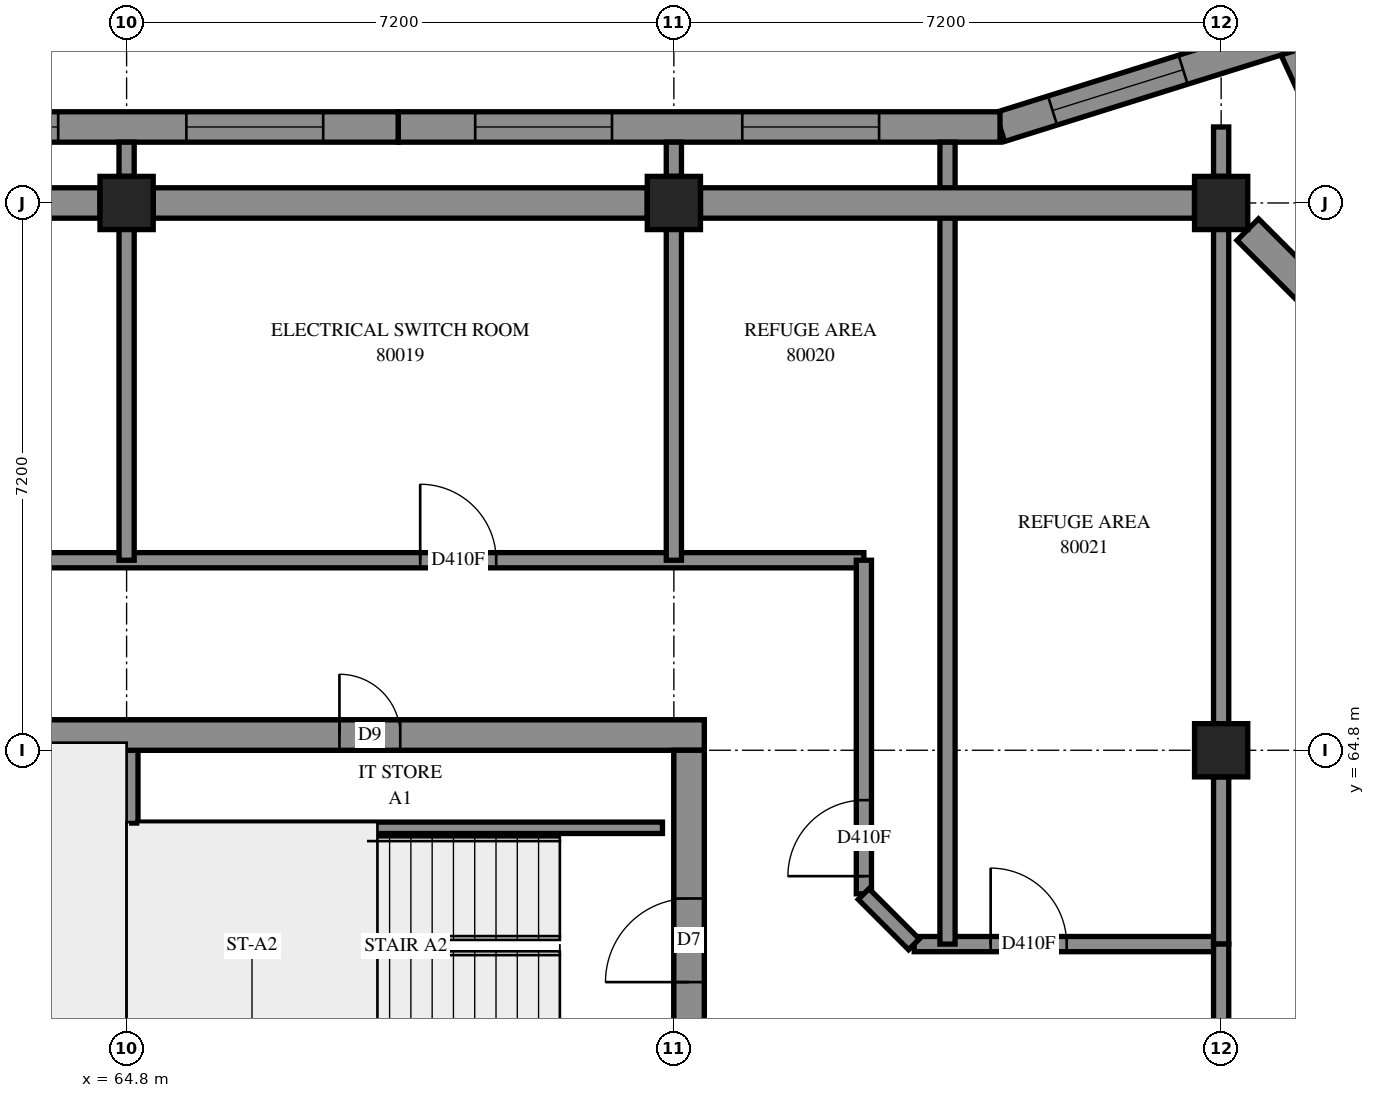
"""IFC4 building model, lengths in metres.
Left out: names, types, materials, properties, quantities, classifications, styles, units other than length and angle.
Written with IfcOpenShell. Run it as: python <this file> out.ifc"""

import sys

from ifc_helpers import new_model, si_unit, direction, frame, frame_2d, origin, origin_2d, place, context, subcontext, project, spatial, polyline, rectangle, outline, extrude, element, fill, save


model = new_model("IFC4")
c1 = context("Model", 3, precision=1e-05, world=origin(), true_north=direction((0.0, 1.0)))
c2 = subcontext(c1, "Body", "Model", "MODEL_VIEW")
j1 = project(units=[si_unit("LENGTHUNIT", "METRE"), si_unit("PLANEANGLEUNIT", "RADIAN")], contexts=[c1])
p1 = place(None, origin())
s1 = spatial("IfcSite", under=j1, at=p1, CompositionType="ELEMENT")
p2 = place(p1, origin())
s2 = spatial("IfcBuilding", under=s1, at=p2, CompositionType="ELEMENT")
p3 = place(p2, frame((0.0, 0.0, 294.4)))
s3 = spatial("IfcBuildingStorey", under=s2, at=p3, CompositionType="ELEMENT", Elevation=294.4)
for number, where, z_axis, x_axis in (
    (1, (64.8, 72.0, 0.0), (0.0, 0.0, 1.0), (1.0, 0.0, 0.0)),
    (2, (72.0, 72.0, 0.0), (0.0, 0.0, 1.0), (1.0, 0.0, 0.0)),
    (3, (79.2, 64.8, 0.0), (0.0, 0.0, 1.0), (1.0, 0.0, 0.0)),
    (4, (79.2, 72.0, 0.0), (0.0, 0.0, 1.0), (1.0, 0.0, 0.0)),
):
    element("IfcColumn", number, at=place(p3, frame(where, z_axis=z_axis, x_axis=x_axis)), inside=s3, PredefinedType="COLUMN", context=c2, shape_type="SweptSolid", body=[
        extrude(rectangle(XDim=0.7, YDim=0.7, at=origin_2d()), origin(), (0.0, 0.0, 1.0), 3.5),
    ])
p4 = place(p3, frame((57.2, 65.0, -0.3), z_axis=(0.0, 0.0, 1.0), x_axis=(1.0, 0.0, 0.0)))
e5 = element("IfcWall", 5, at=p4, inside=s3, PredefinedType="SHEAR", context=c2, shape_type="SweptSolid", body=[
    extrude(outline(polyline([(0.0, 0.0), (15.2, 0.0), (15.2, 3.1), (0.0, 3.1), (0.0, 0.0)])), frame((0.0, 0.2, 0.0), z_axis=(0.0, -1.0, 0.0), x_axis=(1.0, 0.0, 0.0)), (0.0, 0.0, 1.0), 0.4),
])
p5 = place(p4, frame((10.4, 0.0, 0.3)))
e6 = element("IfcOpeningElement", 6, at=p5, cuts=e5, PredefinedType="OPENING", context=c2, shape_type="SweptSolid", body=[
    extrude(rectangle(XDim=0.8, YDim=2.1, at=frame_2d((0.4, 1.05))), frame((0.0, 0.21, 0.0), z_axis=(0.0, -1.0, 0.0), x_axis=(1.0, 0.0, 0.0)), (0.0, 0.0, 1.0), 0.42),
])
p6 = place(p3, frame((72.2, 50.4, -0.3), z_axis=(0.0, 0.0, 1.0), x_axis=(0.0, 1.0, 0.0)))
e7 = element("IfcWall", 7, at=p6, inside=s3, PredefinedType="SHEAR", context=c2, shape_type="SweptSolid", body=[
    extrude(outline(polyline([(0.0, 0.0), (14.4, 0.0), (14.4, 3.1), (0.0, 3.1), (0.0, 0.0)])), frame((0.0, 0.2, 0.0), z_axis=(0.0, -1.0, 0.0), x_axis=(1.0, 0.0, 0.0)), (0.0, 0.0, 1.0), 0.4),
])
p7 = place(p6, frame((4.55, 0.0, 0.3)))
e8 = element("IfcOpeningElement", 8, at=p7, cuts=e7, PredefinedType="OPENING", context=c2, shape_type="SweptSolid", body=[
    extrude(rectangle(XDim=1.1, YDim=2.1, at=frame_2d((0.55, 1.05))), frame((0.0, 0.21, 0.0), z_axis=(0.0, -1.0, 0.0), x_axis=(1.0, 0.0, 0.0)), (0.0, 0.0, 1.0), 0.42),
])
p8 = place(p6, frame((11.35, 0.0, 0.3)))
e9 = element("IfcOpeningElement", 9, at=p8, cuts=e7, PredefinedType="OPENING", context=c2, shape_type="SweptSolid", body=[
    extrude(rectangle(XDim=1.1, YDim=2.1, at=frame_2d((0.55, 1.05))), frame((0.0, 0.21, 0.0), z_axis=(0.0, -1.0, 0.0), x_axis=(1.0, 0.0, 0.0)), (0.0, 0.0, 1.0), 0.42),
])
p9 = place(p3, frame((64.8, 60.6, 0.0), z_axis=(0.0, 0.0, 1.0), x_axis=(0.0, 1.0, 0.0)))
e10 = element("IfcWall", 10, at=p9, inside=s3, PredefinedType="SOLIDWALL", context=c2, shape_type="SweptSolid", body=[
    extrude(outline(polyline([(0.0, 0.0), (4.2, 0.0), (4.2, 3.5), (0.0, 3.5), (0.0, 0.0)])), frame((0.0, 0.15, 0.0), z_axis=(0.0, -1.0, 0.0), x_axis=(1.0, 0.0, 0.0)), (0.0, 0.0, 1.0), 0.3),
])
p10 = place(p3, frame((81.53, 71.085, 0.0), z_axis=(0.0, 0.0, 1.0), x_axis=(-0.4192825023, 0.9078558163, 0.0)))
e11 = element("IfcWall", 11, at=p10, inside=s3, PredefinedType="SOLIDWALL", context=c2, shape_type="SweptSolid", body=[
    extrude(outline(polyline([(0.036, -0.2), (3.596, -0.2), (3.245, 0.2), (-0.036, 0.2), (0.036, -0.2)])), origin(), (0.0, 0.0, 1.0), 3.5),
])
p11 = place(p10, frame((0.423, 0.0, 0.7)))
e12 = element("IfcOpeningElement", 12, at=p11, cuts=e11, PredefinedType="OPENING", context=c2, shape_type="SweptSolid", body=[
    extrude(rectangle(XDim=1.8, YDim=2.2, at=frame_2d((0.9, 1.1))), frame((0.0, 0.21, 0.0), z_axis=(0.0, -1.0, 0.0), x_axis=(1.0, 0.0, 0.0)), (0.0, 0.0, 1.0), 0.42),
])
p12 = place(p3, frame((80.096, 74.19, 0.0), z_axis=(0.0, 0.0, 1.0), x_axis=(-0.9544366751, -0.2984135272, 0.0)))
e13 = element("IfcWall", 13, at=p12, inside=s3, PredefinedType="SOLIDWALL", context=c2, shape_type="SweptSolid", body=[
    extrude(outline(polyline([(-0.176, -0.2), (3.956, -0.2), (4.017, 0.2), (0.176, 0.2), (-0.176, -0.2)])), origin(), (0.0, 0.0, 1.0), 3.5),
])
p13 = place(p12, frame((1.463, 0.0, 0.7)))
e14 = element("IfcOpeningElement", 14, at=p13, cuts=e13, PredefinedType="OPENING", context=c2, shape_type="SweptSolid", body=[
    extrude(rectangle(XDim=1.8, YDim=2.2, at=frame_2d((0.9, 1.1))), frame((0.0, 0.21, 0.0), z_axis=(0.0, -1.0, 0.0), x_axis=(1.0, 0.0, 0.0)), (0.0, 0.0, 1.0), 0.42),
])
p14 = place(p3, frame((76.29, 73.0, 0.0), z_axis=(0.0, 0.0, 1.0), x_axis=(-1.0, 0.0, 0.0)))
e15 = element("IfcWall", 15, at=p14, inside=s3, PredefinedType="SOLIDWALL", context=c2, shape_type="SweptSolid", body=[
    extrude(outline(polyline([(0.03, -0.2), (7.918, -0.2), (7.918, 0.2), (-0.03, 0.2), (0.03, -0.2)])), origin(), (0.0, 0.0, 1.0), 3.5),
])
p15 = place(p14, frame((1.591, 0.0, 0.7)))
e16 = element("IfcOpeningElement", 16, at=p15, cuts=e15, PredefinedType="OPENING", context=c2, shape_type="SweptSolid", body=[
    extrude(rectangle(XDim=1.8, YDim=2.2, at=frame_2d((0.9, 1.1))), frame((0.0, 0.21, 0.0), z_axis=(0.0, -1.0, 0.0), x_axis=(1.0, 0.0, 0.0)), (0.0, 0.0, 1.0), 0.42),
])
p16 = place(p14, frame((5.104, 0.0, 0.7)))
e17 = element("IfcOpeningElement", 17, at=p16, cuts=e15, PredefinedType="OPENING", context=c2, shape_type="SweptSolid", body=[
    extrude(rectangle(XDim=1.8, YDim=2.2, at=frame_2d((0.9, 1.1))), frame((0.0, 0.21, 0.0), z_axis=(0.0, -1.0, 0.0), x_axis=(1.0, 0.0, 0.0)), (0.0, 0.0, 1.0), 0.42),
])
p17 = place(p3, frame((68.373, 73.0, 0.0), z_axis=(0.0, 0.0, 1.0), x_axis=(-1.0, 0.0, 0.0)))
e18 = element("IfcWall", 18, at=p17, inside=s3, PredefinedType="SOLIDWALL", context=c2, shape_type="SweptSolid", body=[
    extrude(outline(polyline([(0.0, -0.2), (7.887, -0.2), (7.887, 0.2), (0.0, 0.2), (0.0, -0.2)])), origin(), (0.0, 0.0, 1.0), 3.5),
])
p18 = place(p17, frame((0.986, 0.0, 0.7)))
e19 = element("IfcOpeningElement", 19, at=p18, cuts=e18, PredefinedType="OPENING", context=c2, shape_type="SweptSolid", body=[
    extrude(rectangle(XDim=1.8, YDim=2.2, at=frame_2d((0.9, 1.1))), frame((0.0, 0.21, 0.0), z_axis=(0.0, -1.0, 0.0), x_axis=(1.0, 0.0, 0.0)), (0.0, 0.0, 1.0), 0.42),
])
p19 = place(p17, frame((4.473, 0.0, 0.7)))
e20 = element("IfcOpeningElement", 20, at=p19, cuts=e18, PredefinedType="OPENING", context=c2, shape_type="SweptSolid", body=[
    extrude(rectangle(XDim=1.8, YDim=2.2, at=frame_2d((0.9, 1.1))), frame((0.0, 0.21, 0.0), z_axis=(0.0, -1.0, 0.0), x_axis=(1.0, 0.0, 0.0)), (0.0, 0.0, 1.0), 0.42),
])
p20 = place(p3, frame((64.95, 63.78, 0.0), z_axis=(0.0, 0.0, 1.0), x_axis=(1.0, 0.0, 0.0)))
e21 = element("IfcWall", 21, at=p20, inside=s3, PredefinedType="PARTITIONING", context=c2, shape_type="SweptSolid", body=[
    extrude(outline(polyline([(0.0, 0.0), (6.9, 0.0), (6.9, 3.5), (0.0, 3.5), (0.0, 0.0)])), frame((0.0, 0.075, 0.0), z_axis=(0.0, -1.0, 0.0), x_axis=(1.0, 0.0, 0.0)), (0.0, 0.0, 1.0), 0.15),
])
p21 = place(p3, frame((55.102, 67.3, 0.0), z_axis=(0.0, 0.0, 1.0), x_axis=(1.0, 0.0, 0.0)))
e22 = element("IfcWall", 22, at=p21, inside=s3, PredefinedType="PARTITIONING", context=c2, shape_type="SweptSolid", body=[
    extrude(rectangle(XDim=19.398, YDim=0.2, at=frame_2d((9.699, 0.0))), origin(), (0.0, 0.0, 1.0), 3.5),
])
p22 = place(p21, frame((6.361, 0.0, 0.0)))
e23 = element("IfcOpeningElement", 23, at=p22, cuts=e22, PredefinedType="OPENING", context=c2, shape_type="SweptSolid", body=[
    extrude(rectangle(XDim=1.0, YDim=2.1, at=frame_2d((0.5, 1.05))), frame((0.0, 0.11, 0.0), z_axis=(0.0, -1.0, 0.0), x_axis=(1.0, 0.0, 0.0)), (0.0, 0.0, 1.0), 0.22),
])
p23 = place(p21, frame((13.56, 0.0, 0.0)))
e24 = element("IfcOpeningElement", 24, at=p23, cuts=e22, PredefinedType="OPENING", context=c2, shape_type="SweptSolid", body=[
    extrude(rectangle(XDim=1.0, YDim=2.1, at=frame_2d((0.5, 1.05))), frame((0.0, 0.11, 0.0), z_axis=(0.0, -1.0, 0.0), x_axis=(1.0, 0.0, 0.0)), (0.0, 0.0, 1.0), 0.22),
])
p24 = place(p3, frame((79.2, 64.45, 0.0), z_axis=(0.0, 0.0, 1.0), x_axis=(0.0, 1.0, 0.0)))
e25 = element("IfcWall", 25, at=p24, inside=s3, PredefinedType="PARTITIONING", context=c2, shape_type="SweptSolid", body=[
    extrude(rectangle(XDim=7.9, YDim=0.2, at=frame_2d((3.95, 0.0))), origin(), (0.0, 0.0, 1.0), 3.5),
])
p25 = place(p3, frame((74.5, 62.912, 0.0), z_axis=(0.0, 0.0, 1.0), x_axis=(0.0, 1.0, 0.0)))
e26 = element("IfcWall", 26, at=p25, inside=s3, PredefinedType="PARTITIONING", context=c2, shape_type="SweptSolid", body=[
    extrude(rectangle(XDim=4.388, YDim=0.2, at=frame_2d((2.194, 0.0))), origin(), (0.0, 0.0, 1.0), 3.5),
])
p26 = place(p25, frame((0.232, 0.0, 0.0)))
e27 = element("IfcOpeningElement", 27, at=p26, cuts=e26, PredefinedType="OPENING", context=c2, shape_type="SweptSolid", body=[
    extrude(rectangle(XDim=1.0, YDim=2.1, at=frame_2d((0.5, 1.05))), frame((0.0, 0.11, 0.0), z_axis=(0.0, -1.0, 0.0), x_axis=(1.0, 0.0, 0.0)), (0.0, 0.0, 1.0), 0.22),
])
for number, where, z_axis, x_axis in (
    (28, (64.8, 67.3, 0.0), (0.0, 0.0, 1.0), (0.0, 1.0, 0.0)),
    (29, (72.0, 67.3, 0.0), (0.0, 0.0, 1.0), (0.0, 1.0, 0.0)),
):
    element("IfcWall", number, at=place(p3, frame(where, z_axis=z_axis, x_axis=x_axis)), inside=s3, PredefinedType="PARTITIONING", context=c2, shape_type="SweptSolid", body=[
        extrude(rectangle(XDim=5.05, YDim=0.2, at=frame_2d((2.525, 0.0))), origin(), (0.0, 0.0, 1.0), 3.5),
    ])
p27 = place(p3, frame((75.162, 62.25, 0.0), z_axis=(0.0, 0.0, 1.0), x_axis=(1.0, 0.0, 0.0)))
e30 = element("IfcWall", 30, at=p27, inside=s3, PredefinedType="PARTITIONING", context=c2, shape_type="SweptSolid", body=[
    extrude(rectangle(XDim=4.038, YDim=0.2, at=frame_2d((2.019, 0.0))), origin(), (0.0, 0.0, 1.0), 3.5),
])
p28 = place(p27, frame((1.006, 0.0, 0.0)))
e31 = element("IfcOpeningElement", 31, at=p28, cuts=e30, PredefinedType="OPENING", context=c2, shape_type="SweptSolid", body=[
    extrude(rectangle(XDim=1.0, YDim=2.1, at=frame_2d((0.5, 1.05))), frame((0.0, 0.11, 0.0), z_axis=(0.0, -1.0, 0.0), x_axis=(1.0, 0.0, 0.0)), (0.0, 0.0, 1.0), 0.22),
])
p29 = place(p3, frame((79.2, 62.25, 0.0), z_axis=(0.0, 0.0, 1.0), x_axis=(0.0, 1.0, 0.0)))
e32 = element("IfcWall", 32, at=p29, inside=s3, PredefinedType="PARTITIONING", context=c2, shape_type="SweptSolid", body=[
    extrude(rectangle(XDim=2.2, YDim=0.2, at=frame_2d((1.1, 0.0))), origin(), (0.0, 0.0, 1.0), 3.5),
])
p30 = place(p3, frame((79.2, 60.15, 0.0), z_axis=(0.0, 0.0, 1.0), x_axis=(0.0, 1.0, 0.0)))
e33 = element("IfcWall", 33, at=p30, inside=s3, PredefinedType="PARTITIONING", context=c2, shape_type="SweptSolid", body=[
    extrude(rectangle(XDim=2.1, YDim=0.2, at=frame_2d((1.05, 0.0))), origin(), (0.0, 0.0, 1.0), 3.5),
])
p31 = place(p3, frame((74.496, 62.908, 0.0), z_axis=(0.0, 0.0, 1.0), x_axis=(0.7071067812, -0.7071067812, 0.0)))
e34 = element("IfcWall", 34, at=p31, inside=s3, PredefinedType="PARTITIONING", context=c2, shape_type="SweptSolid", body=[
    extrude(rectangle(XDim=0.936, YDim=0.2, at=frame_2d((0.468, 0.0))), origin(), (0.0, 0.0, 1.0), 3.5),
])
p32 = place(p3, frame((79.2, 72.35, 0.0), z_axis=(0.0, 0.0, 1.0), x_axis=(0.0, 1.0, 0.0)))
e35 = element("IfcWall", 35, at=p32, inside=s3, PredefinedType="PARTITIONING", context=c2, shape_type="SweptSolid", body=[
    extrude(rectangle(XDim=0.65, YDim=0.2, at=frame_2d((0.325, 0.0))), origin(), (0.0, 0.0, 1.0), 3.5),
])
p33 = place(p3, frame((75.6, 62.25, 0.0), z_axis=(0.0, 0.0, 1.0), x_axis=(0.0, 1.0, 0.0)))
e36 = element("IfcWall", 36, at=p33, inside=s3, PredefinedType="PARTITIONING", context=c2, shape_type="SweptSolid", body=[
    extrude(outline(polyline([(0.0, -0.1), (10.55, -0.1), (10.55, 0.1), (0.0, 0.1), (0.0, -0.1)])), origin(), (0.0, 0.0, 1.0), 3.5),
])
for number, where, z_axis, x_axis in (
    (37, (64.8, 72.35, 0.0), (0.0, 0.0, 1.0), (0.0, 1.0, 0.0)),
    (38, (72.0, 72.35, 0.0), (0.0, 0.0, 1.0), (0.0, 1.0, 0.0)),
):
    element("IfcWall", number, at=place(p3, frame(where, z_axis=z_axis, x_axis=x_axis)), inside=s3, PredefinedType="PARTITIONING", context=c2, shape_type="SweptSolid", body=[
        extrude(outline(polyline([(0.0, -0.1), (0.45, -0.1), (0.45, 0.1), (0.0, 0.1), (0.0, -0.1)])), origin(), (0.0, 0.0, 1.0), 3.5),
    ])
p34 = place(p13, origin())
e39 = element("IfcWindow", 39, at=p34, inside=s3, PartitioningType="SINGLE_PANEL", PredefinedType="WINDOW", context=c2, shape_type="SweptSolid", body=[
    extrude(rectangle(XDim=1.8, YDim=2.2, at=frame_2d((0.9, 1.1))), frame((0.0, 0.08, 0.0), z_axis=(0.0, -1.0, 0.0), x_axis=(1.0, 0.0, 0.0)), (0.0, 0.0, 1.0), 0.06),
])
fill(e14, e39)
p35 = place(p15, origin())
e40 = element("IfcWindow", 40, at=p35, inside=s3, PartitioningType="SINGLE_PANEL", PredefinedType="WINDOW", context=c2, shape_type="SweptSolid", body=[
    extrude(rectangle(XDim=1.8, YDim=2.2, at=frame_2d((0.9, 1.1))), frame((0.0, 0.08, 0.0), z_axis=(0.0, -1.0, 0.0), x_axis=(1.0, 0.0, 0.0)), (0.0, 0.0, 1.0), 0.06),
])
fill(e16, e40)
p36 = place(p16, origin())
e41 = element("IfcWindow", 41, at=p36, inside=s3, PartitioningType="SINGLE_PANEL", PredefinedType="WINDOW", context=c2, shape_type="SweptSolid", body=[
    extrude(rectangle(XDim=1.8, YDim=2.2, at=frame_2d((0.9, 1.1))), frame((0.0, 0.08, 0.0), z_axis=(0.0, -1.0, 0.0), x_axis=(1.0, 0.0, 0.0)), (0.0, 0.0, 1.0), 0.06),
])
fill(e17, e41)
p37 = place(p18, origin())
e42 = element("IfcWindow", 42, at=p37, inside=s3, PartitioningType="SINGLE_PANEL", PredefinedType="WINDOW", context=c2, shape_type="SweptSolid", body=[
    extrude(rectangle(XDim=1.8, YDim=2.2, at=frame_2d((0.9, 1.1))), frame((0.0, 0.08, 0.0), z_axis=(0.0, -1.0, 0.0), x_axis=(1.0, 0.0, 0.0)), (0.0, 0.0, 1.0), 0.06),
])
fill(e19, e42)
p38 = place(p19, origin())
e43 = element("IfcWindow", 43, at=p38, inside=s3, PartitioningType="SINGLE_PANEL", PredefinedType="WINDOW", context=c2, shape_type="SweptSolid", body=[
    extrude(rectangle(XDim=1.8, YDim=2.2, at=frame_2d((0.9, 1.1))), frame((0.0, 0.08, 0.0), z_axis=(0.0, -1.0, 0.0), x_axis=(1.0, 0.0, 0.0)), (0.0, 0.0, 1.0), 0.06),
])
fill(e20, e43)
p39 = place(p5, origin())
e44 = element("IfcDoor", 44, at=p39, inside=s3, OperationType="SINGLE_SWING_RIGHT", PredefinedType="DOOR", context=c2, shape_type="SweptSolid", body=[
    extrude(rectangle(XDim=0.8, YDim=2.1, at=frame_2d((0.4, 1.05))), frame((0.0, 0.025, 0.0), z_axis=(0.0, -1.0, 0.0), x_axis=(1.0, 0.0, 0.0)), (0.0, 0.0, 1.0), 0.05),
])
fill(e6, e44)
p40 = place(p8, origin())
e45 = element("IfcDoor", 45, at=p40, inside=s3, OperationType="SINGLE_SWING_RIGHT", PredefinedType="DOOR", context=c2, shape_type="SweptSolid", body=[
    extrude(rectangle(XDim=1.1, YDim=2.1, at=frame_2d((0.55, 1.05))), frame((0.0, 0.025, 0.0), z_axis=(0.0, -1.0, 0.0), x_axis=(1.0, 0.0, 0.0)), (0.0, 0.0, 1.0), 0.05),
])
fill(e9, e45)
p41 = place(p23, origin())
e46 = element("IfcDoor", 46, at=p41, inside=s3, OperationType="SINGLE_SWING_RIGHT", PredefinedType="DOOR", context=c2, shape_type="SweptSolid", body=[
    extrude(rectangle(XDim=1.0, YDim=2.1, at=frame_2d((0.5, 1.05))), frame((0.0, 0.025, 0.0), z_axis=(0.0, -1.0, 0.0), x_axis=(1.0, 0.0, 0.0)), (0.0, 0.0, 1.0), 0.05),
])
fill(e24, e46)
p42 = place(p26, origin())
e47 = element("IfcDoor", 47, at=p42, inside=s3, OperationType="SINGLE_SWING_RIGHT", PredefinedType="DOOR", context=c2, shape_type="SweptSolid", body=[
    extrude(rectangle(XDim=1.0, YDim=2.1, at=frame_2d((0.5, 1.05))), frame((0.0, 0.025, 0.0), z_axis=(0.0, -1.0, 0.0), x_axis=(1.0, 0.0, 0.0)), (0.0, 0.0, 1.0), 0.05),
])
fill(e27, e47)
p43 = place(p28, origin())
e48 = element("IfcDoor", 48, at=p43, inside=s3, OperationType="SINGLE_SWING_LEFT", PredefinedType="DOOR", context=c2, shape_type="SweptSolid", body=[
    extrude(rectangle(XDim=1.0, YDim=2.1, at=frame_2d((0.5, 1.05))), frame((0.0, 0.025, 0.0), z_axis=(0.0, -1.0, 0.0), x_axis=(1.0, 0.0, 0.0)), (0.0, 0.0, 1.0), 0.05),
])
fill(e31, e48)
save(model, sys.argv[1])
